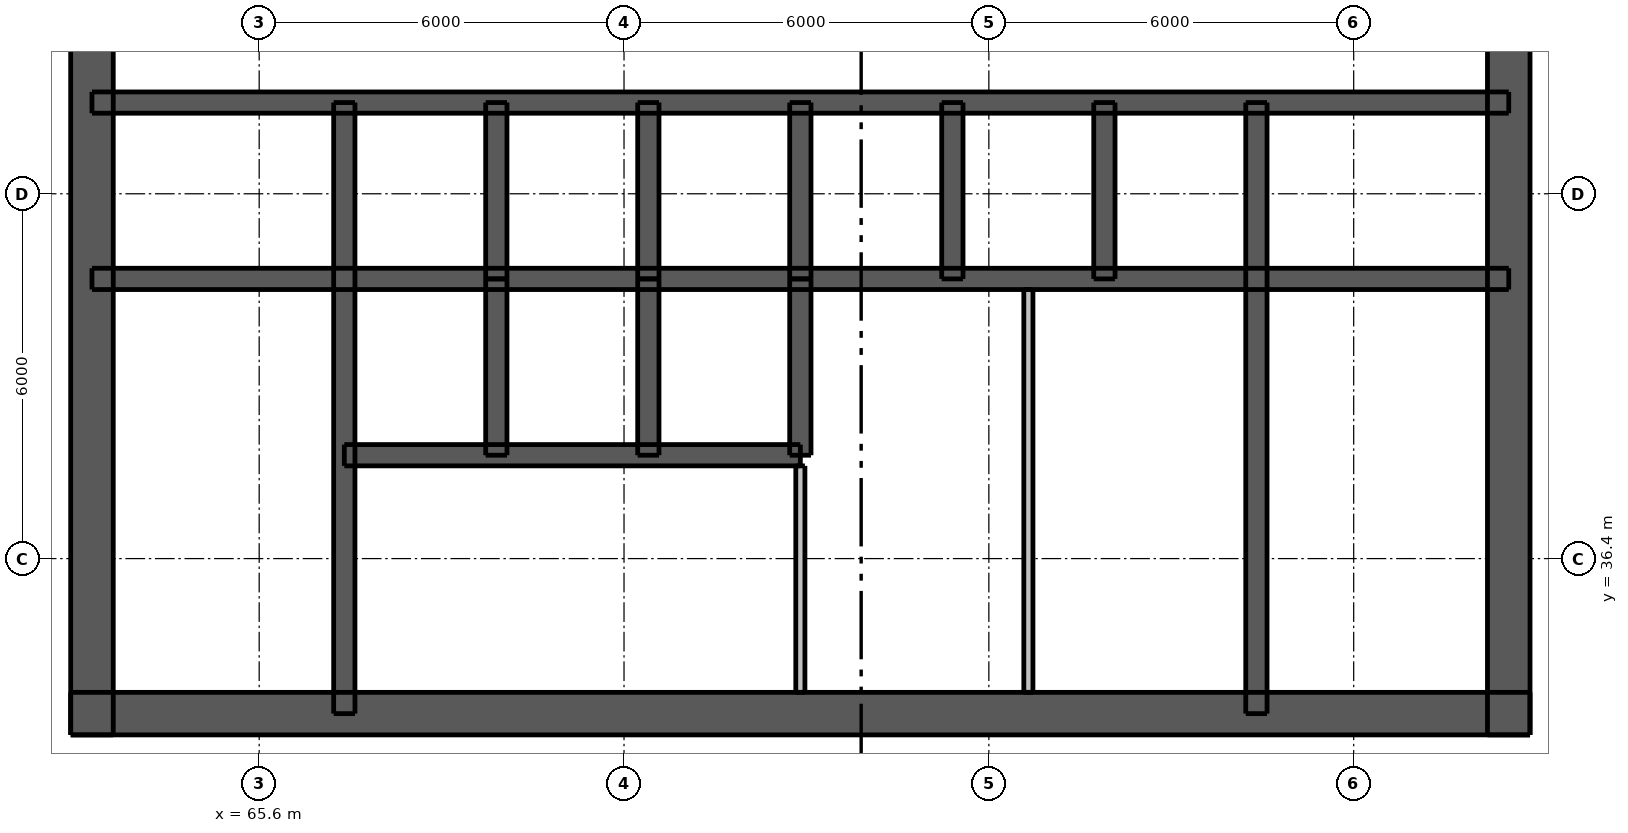
"""IFC4 building model, lengths in metres.
Left out: names, types, materials, properties, quantities, classifications, styles, units other than length and angle.
Written with IfcOpenShell. Run it as: python <this file> out.ifc"""

import sys

from ifc_helpers import new_model, si_unit, direction, frame, frame_2d, origin, place, context, subcontext, project, spatial, rectangle, extrude, element, fill, save


model = new_model("IFC4")
c1 = context("Model", 3, precision=1e-05, world=origin(), true_north=direction((0.0, 1.0)))
c2 = subcontext(c1, "Body", "Model", "MODEL_VIEW")
j1 = project(units=[si_unit("LENGTHUNIT", "METRE"), si_unit("PLANEANGLEUNIT", "RADIAN")], contexts=[c1])
p1 = place(None, origin())
s1 = spatial("IfcSite", under=j1, at=p1, CompositionType="ELEMENT")
p2 = place(p1, origin())
s2 = spatial("IfcBuilding", under=s1, at=p2, CompositionType="ELEMENT")
p3 = place(p2, frame((0.0, 0.0, 158.2)))
s3 = spatial("IfcBuildingStorey", under=s2, at=p3, CompositionType="ELEMENT", Elevation=158.2)
p4 = place(p3, frame((62.5, 33.85, 0.0), z_axis=(0.0, 0.0, 1.0), x_axis=(1.0, 0.0, 0.0)))
e1 = element("IfcWall", 1, at=p4, inside=s3, PredefinedType="SHEAR", context=c2, shape_type="SweptSolid", body=[
    extrude(rectangle(XDim=24.0, YDim=0.7, at=frame_2d((12.0, 0.0))), origin(), (0.0, 0.0, 1.0), 3.05),
])
p5 = place(p4, frame((1.962, 0.0, 0.0)))
e2 = element("IfcOpeningElement", 2, at=p5, cuts=e1, PredefinedType="OPENING", context=c2, shape_type="SweptSolid", body=[
    extrude(rectangle(XDim=1.1, YDim=2.1, at=frame_2d((0.55, 1.05))), frame((0.0, 0.36, 0.0), z_axis=(0.0, -1.0, 0.0), x_axis=(1.0, 0.0, 0.0)), (0.0, 0.0, 1.0), 0.72),
])
p6 = place(p4, frame((20.938, 0.0, 0.0)))
e3 = element("IfcOpeningElement", 3, at=p6, cuts=e1, PredefinedType="OPENING", context=c2, shape_type="SweptSolid", body=[
    extrude(rectangle(XDim=1.1, YDim=2.1, at=frame_2d((0.55, 1.05))), frame((0.0, 0.36, 0.0), z_axis=(0.0, -1.0, 0.0), x_axis=(1.0, 0.0, 0.0)), (0.0, 0.0, 1.0), 0.72),
])
p7 = place(p4, frame((8.0, 0.0, 0.0)))
e4 = element("IfcOpeningElement", 4, at=p7, cuts=e1, PredefinedType="OPENING", context=c2, shape_type="SweptSolid", body=[
    extrude(rectangle(XDim=1.1, YDim=2.1, at=frame_2d((0.55, 1.05))), frame((0.0, 0.36, 0.0), z_axis=(0.0, -1.0, 0.0), x_axis=(1.0, 0.0, 0.0)), (0.0, 0.0, 1.0), 0.72),
])
p8 = place(p4, frame((13.512, 0.0, 0.0)))
e5 = element("IfcOpeningElement", 5, at=p8, cuts=e1, PredefinedType="OPENING", context=c2, shape_type="SweptSolid", body=[
    extrude(rectangle(XDim=0.9, YDim=2.1, at=frame_2d((0.45, 1.05))), frame((0.0, 0.36, 0.0), z_axis=(0.0, -1.0, 0.0), x_axis=(1.0, 0.0, 0.0)), (0.0, 0.0, 1.0), 0.72),
])
p9 = place(p4, frame((17.087, 0.0, 0.0)))
e6 = element("IfcOpeningElement", 6, at=p9, cuts=e1, PredefinedType="OPENING", context=c2, shape_type="SweptSolid", body=[
    extrude(rectangle(XDim=0.9, YDim=2.1, at=frame_2d((0.45, 1.05))), frame((0.0, 0.36, 0.0), z_axis=(0.0, -1.0, 0.0), x_axis=(1.0, 0.0, 0.0)), (0.0, 0.0, 1.0), 0.72),
])
p10 = place(p3, frame((62.85, 33.5, 0.0), z_axis=(0.0, 0.0, 1.0), x_axis=(0.0, 1.0, 0.0)))
e7 = element("IfcWall", 7, at=p10, inside=s3, PredefinedType="SHEAR", context=c2, shape_type="SweptSolid", body=[
    extrude(rectangle(XDim=24.0, YDim=0.7, at=frame_2d((12.0, 0.0))), origin(), (0.0, 0.0, 1.0), 3.05),
])
p11 = place(p10, frame((11.2, 0.0, 0.0)))
e8 = element("IfcOpeningElement", 8, at=p11, cuts=e7, PredefinedType="OPENING", context=c2, shape_type="SweptSolid", body=[
    extrude(rectangle(XDim=1.6, YDim=2.1, at=frame_2d((0.8, 1.05))), frame((0.0, 0.36, 0.0), z_axis=(0.0, -1.0, 0.0), x_axis=(1.0, 0.0, 0.0)), (0.0, 0.0, 1.0), 0.72),
])
p12 = place(p3, frame((86.15, 33.5, 0.0), z_axis=(0.0, 0.0, 1.0), x_axis=(0.0, 1.0, 0.0)))
e9 = element("IfcWall", 9, at=p12, inside=s3, PredefinedType="SHEAR", context=c2, shape_type="SweptSolid", body=[
    extrude(rectangle(XDim=24.0, YDim=0.7, at=frame_2d((12.0, 0.0))), origin(), (0.0, 0.0, 1.0), 3.05),
])
p13 = place(p12, frame((11.2, 0.0, 0.0)))
e10 = element("IfcOpeningElement", 10, at=p13, cuts=e9, PredefinedType="OPENING", context=c2, shape_type="SweptSolid", body=[
    extrude(rectangle(XDim=1.6, YDim=2.1, at=frame_2d((0.8, 1.05))), frame((0.0, 0.36, 0.0), z_axis=(0.0, -1.0, 0.0), x_axis=(1.0, 0.0, 0.0)), (0.0, 0.0, 1.0), 0.72),
])
p14 = place(p3, frame((62.85, 41.0, 0.0), z_axis=(0.0, 0.0, 1.0), x_axis=(1.0, 0.0, 0.0)))
e11 = element("IfcWall", 11, at=p14, inside=s3, PredefinedType="SHEAR", context=c2, shape_type="SweptSolid", body=[
    extrude(rectangle(XDim=23.3, YDim=0.35, at=frame_2d((11.65, 0.0))), origin(), (0.0, 0.0, 1.0), 3.05),
])
p15 = place(p3, frame((62.85, 43.9, 0.0), z_axis=(0.0, 0.0, 1.0), x_axis=(1.0, 0.0, 0.0)))
e12 = element("IfcWall", 12, at=p15, inside=s3, PredefinedType="SHEAR", context=c2, shape_type="SweptSolid", body=[
    extrude(rectangle(XDim=23.3, YDim=0.35, at=frame_2d((11.65, 0.0))), origin(), (0.0, 0.0, 1.0), 3.05),
])
p16 = place(p15, frame((1.712, 0.0, 0.0)))
e13 = element("IfcOpeningElement", 13, at=p16, cuts=e12, PredefinedType="OPENING", context=c2, shape_type="SweptSolid", body=[
    extrude(rectangle(XDim=0.9, YDim=2.1, at=frame_2d((0.45, 1.05))), frame((0.0, 0.185, 0.0), z_axis=(0.0, -1.0, 0.0), x_axis=(1.0, 0.0, 0.0)), (0.0, 0.0, 1.0), 0.37),
])
p17 = place(p15, frame((20.688, 0.0, 0.0)))
e14 = element("IfcOpeningElement", 14, at=p17, cuts=e12, PredefinedType="OPENING", context=c2, shape_type="SweptSolid", body=[
    extrude(rectangle(XDim=0.9, YDim=2.1, at=frame_2d((0.45, 1.05))), frame((0.0, 0.185, 0.0), z_axis=(0.0, -1.0, 0.0), x_axis=(1.0, 0.0, 0.0)), (0.0, 0.0, 1.0), 0.37),
])
p18 = place(p15, frame((4.95, 0.0, 0.0)))
e15 = element("IfcOpeningElement", 15, at=p18, cuts=e12, PredefinedType="OPENING", context=c2, shape_type="SweptSolid", body=[
    extrude(rectangle(XDim=0.9, YDim=2.1, at=frame_2d((0.45, 1.05))), frame((0.0, 0.185, 0.0), z_axis=(0.0, -1.0, 0.0), x_axis=(1.0, 0.0, 0.0)), (0.0, 0.0, 1.0), 0.37),
])
p19 = place(p15, frame((9.95, 0.0, 0.0)))
e16 = element("IfcOpeningElement", 16, at=p19, cuts=e12, PredefinedType="OPENING", context=c2, shape_type="SweptSolid", body=[
    extrude(rectangle(XDim=0.9, YDim=2.1, at=frame_2d((0.45, 1.05))), frame((0.0, 0.185, 0.0), z_axis=(0.0, -1.0, 0.0), x_axis=(1.0, 0.0, 0.0)), (0.0, 0.0, 1.0), 0.37),
])
p20 = place(p15, frame((12.45, 0.0, 0.0)))
e17 = element("IfcOpeningElement", 17, at=p20, cuts=e12, PredefinedType="OPENING", context=c2, shape_type="SweptSolid", body=[
    extrude(rectangle(XDim=0.9, YDim=2.1, at=frame_2d((0.45, 1.05))), frame((0.0, 0.185, 0.0), z_axis=(0.0, -1.0, 0.0), x_axis=(1.0, 0.0, 0.0)), (0.0, 0.0, 1.0), 0.37),
])
p21 = place(p15, frame((17.45, 0.0, 0.0)))
e18 = element("IfcOpeningElement", 18, at=p21, cuts=e12, PredefinedType="OPENING", context=c2, shape_type="SweptSolid", body=[
    extrude(rectangle(XDim=0.9, YDim=2.1, at=frame_2d((0.45, 1.05))), frame((0.0, 0.185, 0.0), z_axis=(0.0, -1.0, 0.0), x_axis=(1.0, 0.0, 0.0)), (0.0, 0.0, 1.0), 0.37),
])
p22 = place(p3, frame((67.0, 33.85, 0.0), z_axis=(0.0, 0.0, 1.0), x_axis=(0.0, 1.0, 0.0)))
e19 = element("IfcWall", 19, at=p22, inside=s3, PredefinedType="SHEAR", context=c2, shape_type="SweptSolid", body=[
    extrude(rectangle(XDim=10.05, YDim=0.35, at=frame_2d((5.025, 0.0))), origin(), (0.0, 0.0, 1.0), 3.05),
])
p23 = place(p22, frame((0.55, 0.0, 0.0)))
e20 = element("IfcOpeningElement", 20, at=p23, cuts=e19, PredefinedType="OPENING", context=c2, shape_type="SweptSolid", body=[
    extrude(rectangle(XDim=1.1, YDim=2.1, at=frame_2d((0.55, 1.05))), frame((0.0, 0.185, 0.0), z_axis=(0.0, -1.0, 0.0), x_axis=(1.0, 0.0, 0.0)), (0.0, 0.0, 1.0), 0.37),
])
p24 = place(p3, frame((82.0, 33.85, 0.0), z_axis=(0.0, 0.0, 1.0), x_axis=(0.0, 1.0, 0.0)))
e21 = element("IfcWall", 21, at=p24, inside=s3, PredefinedType="SHEAR", context=c2, shape_type="SweptSolid", body=[
    extrude(rectangle(XDim=10.05, YDim=0.35, at=frame_2d((5.025, 0.0))), origin(), (0.0, 0.0, 1.0), 3.05),
])
for number, where, z_axis, x_axis in (
    (22, (69.5, 41.0, 0.0), (0.0, 0.0, 1.0), (0.0, 1.0, 0.0)),
    (23, (72.0, 41.0, 0.0), (0.0, 0.0, 1.0), (0.0, 1.0, 0.0)),
    (24, (74.5, 41.0, 0.0), (0.0, 0.0, 1.0), (0.0, 1.0, 0.0)),
    (25, (77.0, 41.0, 0.0), (0.0, 0.0, 1.0), (0.0, 1.0, 0.0)),
    (26, (79.5, 41.0, 0.0), (0.0, 0.0, 1.0), (0.0, 1.0, 0.0)),
):
    element("IfcWall", number, at=place(p3, frame(where, z_axis=z_axis, x_axis=x_axis)), inside=s3, PredefinedType="SHEAR", context=c2, shape_type="SweptSolid", body=[
        extrude(rectangle(XDim=2.9, YDim=0.35, at=frame_2d((1.45, 0.0))), origin(), (0.0, 0.0, 1.0), 3.05),
    ])
p25 = place(p3, frame((67.0, 38.1, 0.0), z_axis=(0.0, 0.0, 1.0), x_axis=(1.0, 0.0, 0.0)))
e27 = element("IfcWall", 27, at=p25, inside=s3, PredefinedType="SHEAR", context=c2, shape_type="SweptSolid", body=[
    extrude(rectangle(XDim=7.5, YDim=0.35, at=frame_2d((3.75, 0.0))), origin(), (0.0, 0.0, 1.0), 3.05),
])
p26 = place(p25, frame((0.7, 0.0, 0.0)))
e28 = element("IfcOpeningElement", 28, at=p26, cuts=e27, PredefinedType="OPENING", context=c2, shape_type="SweptSolid", body=[
    extrude(rectangle(XDim=1.1, YDim=2.1, at=frame_2d((0.55, 1.05))), frame((0.0, 0.185, 0.0), z_axis=(0.0, -1.0, 0.0), x_axis=(1.0, 0.0, 0.0)), (0.0, 0.0, 1.0), 0.37),
])
p27 = place(p25, frame((3.2, 0.0, 0.0)))
e29 = element("IfcOpeningElement", 29, at=p27, cuts=e27, PredefinedType="OPENING", context=c2, shape_type="SweptSolid", body=[
    extrude(rectangle(XDim=1.1, YDim=2.1, at=frame_2d((0.55, 1.05))), frame((0.0, 0.185, 0.0), z_axis=(0.0, -1.0, 0.0), x_axis=(1.0, 0.0, 0.0)), (0.0, 0.0, 1.0), 0.37),
])
p28 = place(p25, frame((5.65, 0.0, 0.0)))
e30 = element("IfcOpeningElement", 30, at=p28, cuts=e27, PredefinedType="OPENING", context=c2, shape_type="SweptSolid", body=[
    extrude(rectangle(XDim=1.2, YDim=2.1, at=frame_2d((0.6, 1.05))), frame((0.0, 0.185, 0.0), z_axis=(0.0, -1.0, 0.0), x_axis=(1.0, 0.0, 0.0)), (0.0, 0.0, 1.0), 0.37),
])
for number, where, z_axis, x_axis in (
    (31, (69.5, 38.1, 0.0), (0.0, 0.0, 1.0), (0.0, 1.0, 0.0)),
    (32, (72.0, 38.1, 0.0), (0.0, 0.0, 1.0), (0.0, 1.0, 0.0)),
    (33, (74.5, 38.1, 0.0), (0.0, 0.0, 1.0), (0.0, 1.0, 0.0)),
):
    element("IfcWall", number, at=place(p3, frame(where, z_axis=z_axis, x_axis=x_axis)), inside=s3, PredefinedType="SHEAR", context=c2, shape_type="SweptSolid", body=[
        extrude(rectangle(XDim=2.9, YDim=0.35, at=frame_2d((1.45, 0.0))), origin(), (0.0, 0.0, 1.0), 3.05),
    ])
p29 = place(p3, frame((74.5, 34.2, 0.0), z_axis=(0.0, 0.0, 1.0), x_axis=(0.0, 1.0, 0.0)))
e34 = element("IfcWall", 34, at=p29, inside=s3, PredefinedType="PLUMBINGWALL", context=c2, shape_type="SweptSolid", body=[
    extrude(rectangle(XDim=3.725, YDim=0.15, at=frame_2d((1.863, 0.0))), origin(), (0.0, 0.0, 1.0), 3.05),
])
p30 = place(p3, frame((78.25, 34.2, 0.0), z_axis=(0.0, 0.0, 1.0), x_axis=(0.0, 1.0, 0.0)))
e35 = element("IfcWall", 35, at=p30, inside=s3, PredefinedType="PLUMBINGWALL", context=c2, shape_type="SweptSolid", body=[
    extrude(rectangle(XDim=6.625, YDim=0.15, at=frame_2d((3.312, 0.0))), origin(), (0.0, 0.0, 1.0), 3.05),
])
p31 = place(p5, origin())
e36 = element("IfcDoor", 36, at=p31, inside=s3, OperationType="SINGLE_SWING_LEFT", PredefinedType="DOOR", context=c2, shape_type="SweptSolid", body=[
    extrude(rectangle(XDim=1.1, YDim=2.1, at=frame_2d((0.55, 1.05))), frame((0.0, 0.337, 0.0), z_axis=(0.0, -1.0, 0.0), x_axis=(1.0, 0.0, 0.0)), (0.0, 0.0, 1.0), 0.05),
])
fill(e2, e36)
p32 = place(p6, origin())
e37 = element("IfcDoor", 37, at=p32, inside=s3, OperationType="SINGLE_SWING_RIGHT", PredefinedType="DOOR", context=c2, shape_type="SweptSolid", body=[
    extrude(rectangle(XDim=1.1, YDim=2.1, at=frame_2d((0.55, 1.05))), frame((0.0, 0.337, 0.0), z_axis=(0.0, -1.0, 0.0), x_axis=(1.0, 0.0, 0.0)), (0.0, 0.0, 1.0), 0.05),
])
fill(e3, e37)
p33 = place(p11, origin())
e38 = element("IfcDoor", 38, at=p33, inside=s3, OperationType="DOUBLE_DOOR_SINGLE_SWING", PredefinedType="DOOR", context=c2, shape_type="SweptSolid", body=[
    extrude(rectangle(XDim=1.6, YDim=2.1, at=frame_2d((0.8, 1.05))), frame((0.0, -0.288, 0.0), z_axis=(0.0, -1.0, 0.0), x_axis=(1.0, 0.0, 0.0)), (0.0, 0.0, 1.0), 0.05),
])
fill(e8, e38)
p34 = place(p13, origin())
e39 = element("IfcDoor", 39, at=p34, inside=s3, OperationType="DOUBLE_DOOR_SINGLE_SWING", PredefinedType="DOOR", context=c2, shape_type="SweptSolid", body=[
    extrude(rectangle(XDim=1.6, YDim=2.1, at=frame_2d((0.8, 1.05))), frame((0.0, 0.337, 0.0), z_axis=(0.0, -1.0, 0.0), x_axis=(1.0, 0.0, 0.0)), (0.0, 0.0, 1.0), 0.05),
])
fill(e10, e39)
p35 = place(p7, origin())
e40 = element("IfcDoor", 40, at=p35, inside=s3, OperationType="SINGLE_SWING_LEFT", PredefinedType="DOOR", context=c2, shape_type="SweptSolid", body=[
    extrude(rectangle(XDim=1.1, YDim=2.1, at=frame_2d((0.55, 1.05))), frame((0.0, 0.337, 0.0), z_axis=(0.0, -1.0, 0.0), x_axis=(1.0, 0.0, 0.0)), (0.0, 0.0, 1.0), 0.05),
])
fill(e4, e40)
p36 = place(p23, origin())
e41 = element("IfcDoor", 41, at=p36, inside=s3, OperationType="SINGLE_SWING_RIGHT", PredefinedType="DOOR", context=c2, shape_type="SweptSolid", body=[
    extrude(rectangle(XDim=1.1, YDim=2.1, at=frame_2d((0.55, 1.05))), frame((0.0, -0.112, 0.0), z_axis=(0.0, -1.0, 0.0), x_axis=(1.0, 0.0, 0.0)), (0.0, 0.0, 1.0), 0.05),
])
fill(e20, e41)
p37 = place(p8, origin())
e42 = element("IfcDoor", 42, at=p37, inside=s3, OperationType="SINGLE_SWING_LEFT", PredefinedType="DOOR", context=c2, shape_type="SweptSolid", body=[
    extrude(rectangle(XDim=0.9, YDim=2.1, at=frame_2d((0.45, 1.05))), frame((0.0, 0.337, 0.0), z_axis=(0.0, -1.0, 0.0), x_axis=(1.0, 0.0, 0.0)), (0.0, 0.0, 1.0), 0.05),
])
fill(e5, e42)
p38 = place(p9, origin())
e43 = element("IfcDoor", 43, at=p38, inside=s3, OperationType="SINGLE_SWING_LEFT", PredefinedType="DOOR", context=c2, shape_type="SweptSolid", body=[
    extrude(rectangle(XDim=0.9, YDim=2.1, at=frame_2d((0.45, 1.05))), frame((0.0, 0.337, 0.0), z_axis=(0.0, -1.0, 0.0), x_axis=(1.0, 0.0, 0.0)), (0.0, 0.0, 1.0), 0.05),
])
fill(e6, e43)
p39 = place(p16, origin())
e44 = element("IfcDoor", 44, at=p39, inside=s3, OperationType="SINGLE_SWING_LEFT", PredefinedType="DOOR", context=c2, shape_type="SweptSolid", body=[
    extrude(rectangle(XDim=0.9, YDim=2.1, at=frame_2d((0.45, 1.05))), frame((0.0, -0.112, 0.0), z_axis=(0.0, -1.0, 0.0), x_axis=(1.0, 0.0, 0.0)), (0.0, 0.0, 1.0), 0.05),
])
fill(e13, e44)
p40 = place(p17, origin())
e45 = element("IfcDoor", 45, at=p40, inside=s3, OperationType="SINGLE_SWING_LEFT", PredefinedType="DOOR", context=c2, shape_type="SweptSolid", body=[
    extrude(rectangle(XDim=0.9, YDim=2.1, at=frame_2d((0.45, 1.05))), frame((0.0, -0.112, 0.0), z_axis=(0.0, -1.0, 0.0), x_axis=(1.0, 0.0, 0.0)), (0.0, 0.0, 1.0), 0.05),
])
fill(e14, e45)
p41 = place(p18, origin())
e46 = element("IfcDoor", 46, at=p41, inside=s3, OperationType="SINGLE_SWING_RIGHT", PredefinedType="DOOR", context=c2, shape_type="SweptSolid", body=[
    extrude(rectangle(XDim=0.9, YDim=2.1, at=frame_2d((0.45, 1.05))), frame((0.0, -0.112, 0.0), z_axis=(0.0, -1.0, 0.0), x_axis=(1.0, 0.0, 0.0)), (0.0, 0.0, 1.0), 0.05),
])
fill(e15, e46)
p42 = place(p19, origin())
e47 = element("IfcDoor", 47, at=p42, inside=s3, OperationType="SINGLE_SWING_RIGHT", PredefinedType="DOOR", context=c2, shape_type="SweptSolid", body=[
    extrude(rectangle(XDim=0.9, YDim=2.1, at=frame_2d((0.45, 1.05))), frame((0.0, -0.112, 0.0), z_axis=(0.0, -1.0, 0.0), x_axis=(1.0, 0.0, 0.0)), (0.0, 0.0, 1.0), 0.05),
])
fill(e16, e47)
p43 = place(p20, origin())
e48 = element("IfcDoor", 48, at=p43, inside=s3, OperationType="SINGLE_SWING_LEFT", PredefinedType="DOOR", context=c2, shape_type="SweptSolid", body=[
    extrude(rectangle(XDim=0.9, YDim=2.1, at=frame_2d((0.45, 1.05))), frame((0.0, -0.112, 0.0), z_axis=(0.0, -1.0, 0.0), x_axis=(1.0, 0.0, 0.0)), (0.0, 0.0, 1.0), 0.05),
])
fill(e17, e48)
p44 = place(p21, origin())
e49 = element("IfcDoor", 49, at=p44, inside=s3, OperationType="SINGLE_SWING_LEFT", PredefinedType="DOOR", context=c2, shape_type="SweptSolid", body=[
    extrude(rectangle(XDim=0.9, YDim=2.1, at=frame_2d((0.45, 1.05))), frame((0.0, -0.112, 0.0), z_axis=(0.0, -1.0, 0.0), x_axis=(1.0, 0.0, 0.0)), (0.0, 0.0, 1.0), 0.05),
])
fill(e18, e49)
p45 = place(p26, origin())
e50 = element("IfcDoor", 50, at=p45, inside=s3, OperationType="DOUBLE_DOOR_SLIDING", PredefinedType="DOOR", context=c2, shape_type="SweptSolid", body=[
    extrude(rectangle(XDim=1.1, YDim=2.1, at=frame_2d((0.55, 1.05))), frame((0.0, 0.025, 0.0), z_axis=(0.0, -1.0, 0.0), x_axis=(1.0, 0.0, 0.0)), (0.0, 0.0, 1.0), 0.05),
])
fill(e28, e50)
p46 = place(p27, origin())
e51 = element("IfcDoor", 51, at=p46, inside=s3, OperationType="DOUBLE_DOOR_SLIDING", PredefinedType="DOOR", context=c2, shape_type="SweptSolid", body=[
    extrude(rectangle(XDim=1.1, YDim=2.1, at=frame_2d((0.55, 1.05))), frame((0.0, 0.025, 0.0), z_axis=(0.0, -1.0, 0.0), x_axis=(1.0, 0.0, 0.0)), (0.0, 0.0, 1.0), 0.05),
])
fill(e29, e51)
p47 = place(p28, origin())
e52 = element("IfcDoor", 52, at=p47, inside=s3, OperationType="DOUBLE_DOOR_SLIDING", PredefinedType="DOOR", context=c2, shape_type="SweptSolid", body=[
    extrude(rectangle(XDim=1.2, YDim=2.1, at=frame_2d((0.6, 1.05))), frame((0.0, 0.025, 0.0), z_axis=(0.0, -1.0, 0.0), x_axis=(1.0, 0.0, 0.0)), (0.0, 0.0, 1.0), 0.05),
])
fill(e30, e52)
save(model, sys.argv[1])
